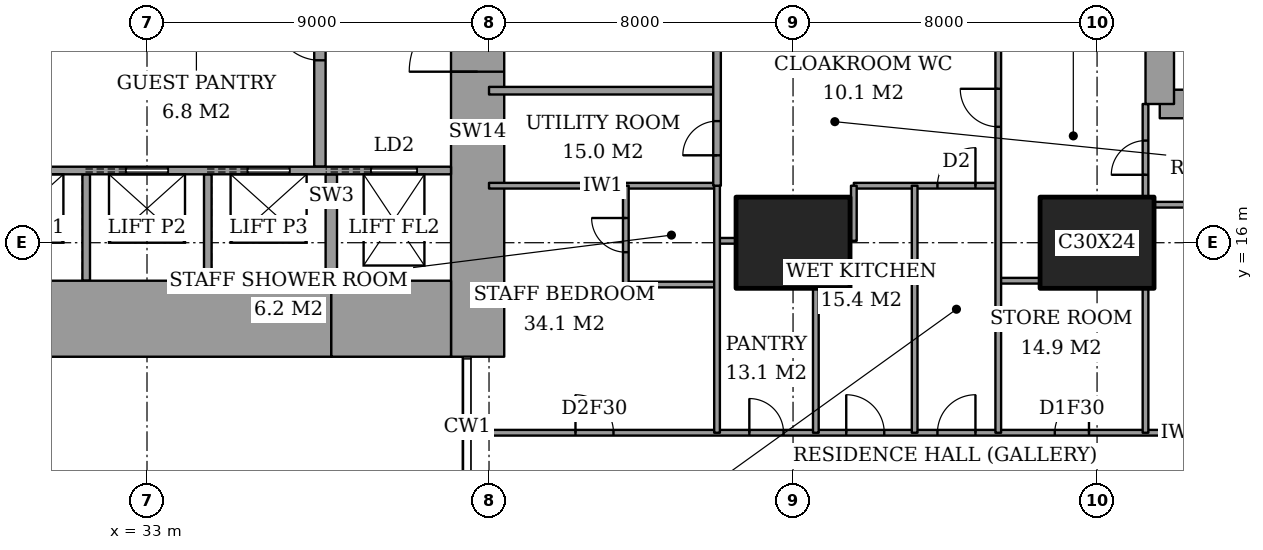
"""IFC4 building model, lengths in metres.
Left out: names, types, materials, properties, quantities, classifications, styles, units other than length and angle.
Written with IfcOpenShell. Run it as: python <this file> out.ifc"""

import sys

from ifc_helpers import new_model, si_unit, direction, frame, frame_2d, origin, origin_2d, place, context, subcontext, project, spatial, rectangle, extrude, element, fill, save


model = new_model("IFC4")
c1 = context("Model", 3, precision=1e-05, world=origin(), true_north=direction((0.0, 1.0)))
c2 = subcontext(c1, "Body", "Model", "MODEL_VIEW")
j1 = project(units=[si_unit("LENGTHUNIT", "METRE"), si_unit("PLANEANGLEUNIT", "RADIAN")], contexts=[c1])
p1 = place(None, origin())
s1 = spatial("IfcSite", under=j1, at=p1, CompositionType="ELEMENT")
p2 = place(p1, origin())
s2 = spatial("IfcBuilding", under=s1, at=p2, CompositionType="ELEMENT")
p3 = place(p2, frame((0.0, 0.0, 161.0)))
s3 = spatial("IfcBuildingStorey", under=s2, at=p3, CompositionType="ELEMENT", Elevation=161.0)
for number, where, z_axis, x_axis in (
    (1, (50.0, 16.0, 0.0), (0.0, 0.0, 1.0), (1.0, 0.0, 0.0)),
    (2, (58.0, 16.0, 0.0), (0.0, 0.0, 1.0), (1.0, 0.0, 0.0)),
):
    element("IfcColumn", number, at=place(p3, frame(where, z_axis=z_axis, x_axis=x_axis)), inside=s3, PredefinedType="COLUMN", context=c2, shape_type="SweptSolid", body=[
        extrude(rectangle(XDim=3.0, YDim=2.4, at=origin_2d()), origin(), (0.0, 0.0, 1.0), 3.6),
    ])
p4 = place(p3, frame((28.15, 14.0, 0.0), z_axis=(0.0, 0.0, 1.0), x_axis=(1.0, 0.0, 0.0)))
e3 = element("IfcWall", 3, at=p4, inside=s3, PredefinedType="SHEAR", context=c2, shape_type="SweptSolid", body=[
    extrude(rectangle(XDim=9.7, YDim=2.0, at=frame_2d((4.85, 0.0))), origin(), (0.0, 0.0, 1.0), 3.6),
])
p5 = place(p3, frame((37.85, 14.0, 0.0), z_axis=(0.0, 0.0, 1.0), x_axis=(1.0, 0.0, 0.0)))
e4 = element("IfcWall", 4, at=p5, inside=s3, PredefinedType="SHEAR", context=c2, shape_type="SweptSolid", body=[
    extrude(rectangle(XDim=3.15, YDim=2.0, at=frame_2d((1.575, 0.0))), origin(), (0.0, 0.0, 1.0), 3.6),
])
p6 = place(p3, frame((41.7, 13.0, 0.0), z_axis=(0.0, 0.0, 1.0), x_axis=(0.0, 1.0, 0.0)))
e5 = element("IfcWall", 5, at=p6, inside=s3, PredefinedType="SHEAR", context=c2, shape_type="SweptSolid", body=[
    extrude(rectangle(XDim=11.85, YDim=1.4, at=frame_2d((5.925, 0.0))), origin(), (0.0, 0.0, 1.0), 3.6),
])
p7 = place(p6, frame((7.5, 0.0, 0.0)))
e6 = element("IfcOpeningElement", 6, at=p7, cuts=e5, PredefinedType="OPENING", context=c2, shape_type="SweptSolid", body=[
    extrude(rectangle(XDim=1.8, YDim=2.4, at=frame_2d((0.9, 1.2))), frame((0.0, 0.71, 0.0), z_axis=(0.0, -1.0, 0.0), x_axis=(1.0, 0.0, 0.0)), (0.0, 0.0, 1.0), 1.42),
])
p8 = place(p3, frame((37.55, 18.0, 0.0), z_axis=(0.0, 0.0, 1.0), x_axis=(0.0, 1.0, 0.0)))
e7 = element("IfcWall", 7, at=p8, inside=s3, PredefinedType="PARTITIONING", context=c2, shape_type="SweptSolid", body=[
    extrude(rectangle(XDim=6.7, YDim=0.3, at=frame_2d((3.35, 0.0))), origin(), (0.0, 0.0, 1.0), 3.6),
])
p9 = place(p8, frame((2.8, 0.0, 0.0)))
e8 = element("IfcOpeningElement", 8, at=p9, cuts=e7, PredefinedType="OPENING", context=c2, shape_type="SweptSolid", body=[
    extrude(rectangle(XDim=1.2, YDim=2.1, at=frame_2d((0.6, 1.05))), frame((0.0, 0.16, 0.0), z_axis=(0.0, -1.0, 0.0), x_axis=(1.0, 0.0, 0.0)), (0.0, 0.0, 1.0), 0.32),
])
p10 = place(p3, frame((59.65, 19.65, 0.0), z_axis=(0.0, 0.0, 1.0), x_axis=(1.0, 0.0, 0.0)))
e9 = element("IfcWall", 9, at=p10, inside=s3, PredefinedType="SHEAR", context=c2, shape_type="SweptSolid", body=[
    extrude(rectangle(XDim=4.45, YDim=0.75, at=frame_2d((2.225, 0.0))), origin(), (0.0, 0.0, 1.0), 3.6),
])
p11 = place(p3, frame((59.65, 28.35, 0.0), z_axis=(0.0, 0.0, 1.0), x_axis=(0.0, -1.0, 0.0)))
e10 = element("IfcWall", 10, at=p11, inside=s3, PredefinedType="SHEAR", context=c2, shape_type="SweptSolid", body=[
    extrude(rectangle(XDim=8.7, YDim=0.75, at=frame_2d((4.35, 0.0))), origin(), (0.0, 0.0, 1.0), 3.6),
])
p12 = place(p11, frame((0.975, 0.0, 0.0)))
e11 = element("IfcOpeningElement", 11, at=p12, cuts=e10, PredefinedType="OPENING", context=c2, shape_type="SweptSolid", body=[
    extrude(rectangle(XDim=1.0, YDim=2.1, at=frame_2d((0.5, 1.05))), frame((0.0, 0.385, 0.0), z_axis=(0.0, -1.0, 0.0), x_axis=(1.0, 0.0, 0.0)), (0.0, 0.0, 1.0), 0.77),
])
p13 = place(p3, frame((41.439, 11.0, 0.0), z_axis=(0.0, 0.0, 1.0), x_axis=(1.0, 0.0, 0.0)))
e12 = element("IfcWall", 12, at=p13, inside=s3, PredefinedType="PARTITIONING", context=c2, shape_type="SweptSolid", body=[
    extrude(rectangle(XDim=25.011, YDim=0.15, at=frame_2d((12.505, 0.0))), origin(), (0.0, 0.0, 1.0), 3.35),
])
p14 = place(p13, frame((12.361, 0.0, 0.0)))
e13 = element("IfcOpeningElement", 13, at=p14, cuts=e12, PredefinedType="OPENING", context=c2, shape_type="SweptSolid", body=[
    extrude(rectangle(XDim=1.0, YDim=2.1, at=frame_2d((0.5, 1.05))), frame((0.0, 0.085, 0.0), z_axis=(0.0, -1.0, 0.0), x_axis=(1.0, 0.0, 0.0)), (0.0, 0.0, 1.0), 0.17),
])
p15 = place(p13, frame((20.924, 0.0, 0.0)))
e14 = element("IfcOpeningElement", 14, at=p15, cuts=e12, PredefinedType="OPENING", context=c2, shape_type="SweptSolid", body=[
    extrude(rectangle(XDim=1.0, YDim=2.1, at=frame_2d((0.5, 1.05))), frame((0.0, 0.085, 0.0), z_axis=(0.0, -1.0, 0.0), x_axis=(1.0, 0.0, 0.0)), (0.0, 0.0, 1.0), 0.17),
])
p16 = place(p13, frame((15.448, 0.0, 0.0)))
e15 = element("IfcOpeningElement", 15, at=p16, cuts=e12, PredefinedType="OPENING", context=c2, shape_type="SweptSolid", body=[
    extrude(rectangle(XDim=0.9, YDim=2.1, at=frame_2d((0.45, 1.05))), frame((0.0, 0.085, 0.0), z_axis=(0.0, -1.0, 0.0), x_axis=(1.0, 0.0, 0.0)), (0.0, 0.0, 1.0), 0.17),
])
p17 = place(p13, frame((9.961, 0.0, 0.0)))
e16 = element("IfcOpeningElement", 16, at=p17, cuts=e12, PredefinedType="OPENING", context=c2, shape_type="SweptSolid", body=[
    extrude(rectangle(XDim=1.0, YDim=2.1, at=frame_2d((0.5, 1.05))), frame((0.0, 0.085, 0.0), z_axis=(0.0, -1.0, 0.0), x_axis=(1.0, 0.0, 0.0)), (0.0, 0.0, 1.0), 0.17),
])
p18 = place(p13, frame((7.411, 0.0, 0.0)))
e17 = element("IfcOpeningElement", 17, at=p18, cuts=e12, PredefinedType="OPENING", context=c2, shape_type="SweptSolid", body=[
    extrude(rectangle(XDim=0.9, YDim=2.1, at=frame_2d((0.45, 1.05))), frame((0.0, 0.085, 0.0), z_axis=(0.0, -1.0, 0.0), x_axis=(1.0, 0.0, 0.0)), (0.0, 0.0, 1.0), 0.17),
])
p19 = place(p13, frame((2.836, 0.0, 0.0)))
e18 = element("IfcOpeningElement", 18, at=p19, cuts=e12, PredefinedType="OPENING", context=c2, shape_type="SweptSolid", body=[
    extrude(rectangle(XDim=1.0, YDim=2.1, at=frame_2d((0.5, 1.05))), frame((0.0, 0.085, 0.0), z_axis=(0.0, -1.0, 0.0), x_axis=(1.0, 0.0, 0.0)), (0.0, 0.0, 1.0), 0.17),
])
p20 = place(p3, frame((45.6, 14.9, 0.0), z_axis=(0.0, 0.0, 1.0), x_axis=(1.0, 0.0, 0.0)))
e19 = element("IfcWall", 19, at=p20, inside=s3, PredefinedType="PARTITIONING", context=c2, shape_type="SweptSolid", body=[
    extrude(rectangle(XDim=2.4, YDim=0.15, at=frame_2d((1.2, 0.0))), origin(), (0.0, 0.0, 1.0), 3.35),
])
p21 = place(p3, frame((55.4, 15.0, 0.0), z_axis=(0.0, 0.0, 1.0), x_axis=(1.0, 0.0, 0.0)))
e20 = element("IfcWall", 20, at=p21, inside=s3, PredefinedType="PARTITIONING", context=c2, shape_type="SweptSolid", body=[
    extrude(rectangle(XDim=1.1, YDim=0.15, at=frame_2d((0.55, 0.0))), origin(), (0.0, 0.0, 1.0), 3.35),
])
p22 = place(p3, frame((48.0, 16.05, 0.0), z_axis=(0.0, 0.0, 1.0), x_axis=(1.0, 0.0, 0.0)))
e21 = element("IfcWall", 21, at=p22, inside=s3, PredefinedType="PARTITIONING", context=c2, shape_type="SweptSolid", body=[
    extrude(rectangle(XDim=0.5, YDim=0.15, at=frame_2d((0.25, 0.0))), origin(), (0.0, 0.0, 1.0), 2.634),
])
p23 = place(p3, frame((59.5, 17.0, 0.0), z_axis=(0.0, 0.0, 1.0), x_axis=(1.0, 0.0, 0.0)))
e22 = element("IfcWall", 22, at=p23, inside=s3, PredefinedType="PARTITIONING", context=c2, shape_type="SweptSolid", body=[
    extrude(rectangle(XDim=5.15, YDim=0.15, at=frame_2d((2.575, 0.0))), origin(), (0.0, 0.0, 1.0), 3.35),
])
p24 = place(p3, frame((42.0, 17.5, 0.0), z_axis=(0.0, 0.0, 1.0), x_axis=(1.0, 0.0, 0.0)))
e23 = element("IfcWall", 23, at=p24, inside=s3, PredefinedType="PARTITIONING", context=c2, shape_type="SweptSolid", body=[
    extrude(rectangle(XDim=6.0, YDim=0.15, at=frame_2d((3.0, 0.0))), origin(), (0.0, 0.0, 1.0), 3.35),
])
p25 = place(p3, frame((51.6, 17.5, 0.0), z_axis=(0.0, 0.0, 1.0), x_axis=(1.0, 0.0, 0.0)))
e24 = element("IfcWall", 24, at=p25, inside=s3, PredefinedType="PARTITIONING", context=c2, shape_type="SweptSolid", body=[
    extrude(rectangle(XDim=3.8, YDim=0.15, at=frame_2d((1.9, 0.0))), origin(), (0.0, 0.0, 1.0), 3.35),
])
p26 = place(p25, frame((2.2, 0.0, 0.0)))
e25 = element("IfcOpeningElement", 25, at=p26, cuts=e24, PredefinedType="OPENING", context=c2, shape_type="SweptSolid", body=[
    extrude(rectangle(XDim=1.0, YDim=2.1, at=frame_2d((0.5, 1.05))), frame((0.0, 0.085, 0.0), z_axis=(0.0, -1.0, 0.0), x_axis=(1.0, 0.0, 0.0)), (0.0, 0.0, 1.0), 0.17),
])
p27 = place(p3, frame((42.0, 20.0, 0.0), z_axis=(0.0, 0.0, 1.0), x_axis=(1.0, 0.0, 0.0)))
e26 = element("IfcWall", 26, at=p27, inside=s3, PredefinedType="PARTITIONING", context=c2, shape_type="SweptSolid", body=[
    extrude(rectangle(XDim=6.0, YDim=0.2, at=frame_2d((3.0, 0.0))), origin(), (0.0, 0.0, 1.0), 3.35),
])
p28 = place(p3, frame((45.6, 14.9, 0.0), z_axis=(0.0, 0.0, 1.0), x_axis=(0.0, 1.0, 0.0)))
e27 = element("IfcWall", 27, at=p28, inside=s3, PredefinedType="PARTITIONING", context=c2, shape_type="SweptSolid", body=[
    extrude(rectangle(XDim=2.6, YDim=0.15, at=frame_2d((1.3, 0.0))), origin(), (0.0, 0.0, 1.0), 3.35),
])
p29 = place(p28, frame((0.85, 0.0, 0.0)))
e28 = element("IfcOpeningElement", 28, at=p29, cuts=e27, PredefinedType="OPENING", context=c2, shape_type="SweptSolid", body=[
    extrude(rectangle(XDim=0.9, YDim=2.1, at=frame_2d((0.45, 1.05))), frame((0.0, 0.085, 0.0), z_axis=(0.0, -1.0, 0.0), x_axis=(1.0, 0.0, 0.0)), (0.0, 0.0, 1.0), 0.17),
])
p30 = place(p3, frame((48.0, 17.5, 0.0), z_axis=(0.0, 0.0, 1.0), x_axis=(0.0, 1.0, 0.0)))
e29 = element("IfcWall", 29, at=p30, inside=s3, PredefinedType="PARTITIONING", context=c2, shape_type="SweptSolid", body=[
    extrude(rectangle(XDim=6.5, YDim=0.2, at=frame_2d((3.25, 0.0))), origin(), (0.0, 0.0, 1.0), 3.35),
])
p31 = place(p30, frame((3.9, 0.0, 0.0)))
e30 = element("IfcOpeningElement", 30, at=p31, cuts=e29, PredefinedType="OPENING", context=c2, shape_type="SweptSolid", body=[
    extrude(rectangle(XDim=1.2, YDim=2.4, at=frame_2d((0.6, 1.2))), frame((0.0, 0.11, 0.0), z_axis=(0.0, -1.0, 0.0), x_axis=(1.0, 0.0, 0.0)), (0.0, 0.0, 1.0), 0.22),
])
p32 = place(p30, frame((0.8, 0.0, 0.0)))
e31 = element("IfcOpeningElement", 31, at=p32, cuts=e29, PredefinedType="OPENING", context=c2, shape_type="SweptSolid", body=[
    extrude(rectangle(XDim=0.9, YDim=2.1, at=frame_2d((0.45, 1.05))), frame((0.0, 0.11, 0.0), z_axis=(0.0, -1.0, 0.0), x_axis=(1.0, 0.0, 0.0)), (0.0, 0.0, 1.0), 0.22),
])
p33 = place(p3, frame((48.0, 11.0, 0.0), z_axis=(0.0, 0.0, 1.0), x_axis=(0.0, 1.0, 0.0)))
e32 = element("IfcWall", 32, at=p33, inside=s3, PredefinedType="PARTITIONING", context=c2, shape_type="SweptSolid", body=[
    extrude(rectangle(XDim=6.5, YDim=0.15, at=frame_2d((3.25, 0.0))), origin(), (0.0, 0.0, 1.0), 3.35),
])
p34 = place(p3, frame((50.6, 11.0, 0.0), z_axis=(0.0, 0.0, 1.0), x_axis=(0.0, 1.0, 0.0)))
e33 = element("IfcWall", 33, at=p34, inside=s3, PredefinedType="PARTITIONING", context=c2, shape_type="SweptSolid", body=[
    extrude(rectangle(XDim=3.8, YDim=0.15, at=frame_2d((1.9, 0.0))), origin(), (0.0, 0.0, 1.0), 3.35),
])
p35 = place(p3, frame((51.6, 16.05, 0.0), z_axis=(0.0, 0.0, 1.0), x_axis=(0.0, 1.0, 0.0)))
e34 = element("IfcWall", 34, at=p35, inside=s3, PredefinedType="PARTITIONING", context=c2, shape_type="SweptSolid", body=[
    extrude(rectangle(XDim=1.45, YDim=0.15, at=frame_2d((0.725, 0.0))), origin(), (0.0, 0.0, 1.0), 3.35),
])
p36 = place(p3, frame((53.2, 11.0, 0.0), z_axis=(0.0, 0.0, 1.0), x_axis=(0.0, 1.0, 0.0)))
e35 = element("IfcWall", 35, at=p36, inside=s3, PredefinedType="PARTITIONING", context=c2, shape_type="SweptSolid", body=[
    extrude(rectangle(XDim=6.5, YDim=0.15, at=frame_2d((3.25, 0.0))), origin(), (0.0, 0.0, 1.0), 3.35),
])
p37 = place(p3, frame((55.4, 11.0, 0.0), z_axis=(0.0, 0.0, 1.0), x_axis=(0.0, 1.0, 0.0)))
e36 = element("IfcWall", 36, at=p37, inside=s3, PredefinedType="PARTITIONING", context=c2, shape_type="SweptSolid", body=[
    extrude(rectangle(XDim=10.6, YDim=0.15, at=frame_2d((5.3, 0.0))), origin(), (0.0, 0.0, 1.0), 3.35),
])
p38 = place(p37, frame((8.05, 0.0, 0.0)))
e37 = element("IfcOpeningElement", 37, at=p38, cuts=e36, PredefinedType="OPENING", context=c2, shape_type="SweptSolid", body=[
    extrude(rectangle(XDim=1.0, YDim=2.1, at=frame_2d((0.5, 1.05))), frame((0.0, 0.085, 0.0), z_axis=(0.0, -1.0, 0.0), x_axis=(1.0, 0.0, 0.0)), (0.0, 0.0, 1.0), 0.17),
])
p39 = place(p3, frame((59.275, 11.0, 0.0), z_axis=(0.0, 0.0, 1.0), x_axis=(0.0, 1.0, 0.0)))
e38 = element("IfcWall", 38, at=p39, inside=s3, PredefinedType="PARTITIONING", context=c2, shape_type="SweptSolid", body=[
    extrude(rectangle(XDim=3.8, YDim=0.15, at=frame_2d((1.9, 0.0))), origin(), (0.0, 0.0, 1.0), 3.35),
])
p40 = place(p3, frame((59.275, 17.2, 0.0), z_axis=(0.0, 0.0, 1.0), x_axis=(0.0, 1.0, 0.0)))
e39 = element("IfcWall", 39, at=p40, inside=s3, PredefinedType="PARTITIONING", context=c2, shape_type="SweptSolid", body=[
    extrude(rectangle(XDim=2.45, YDim=0.15, at=frame_2d((1.225, 0.0))), origin(), (0.0, 0.0, 1.0), 3.35),
])
p41 = place(p40, frame((0.587, 0.0, 0.0)))
e40 = element("IfcOpeningElement", 40, at=p41, cuts=e39, PredefinedType="OPENING", context=c2, shape_type="SweptSolid", body=[
    extrude(rectangle(XDim=0.9, YDim=2.1, at=frame_2d((0.45, 1.05))), frame((0.0, 0.085, 0.0), z_axis=(0.0, -1.0, 0.0), x_axis=(1.0, 0.0, 0.0)), (0.0, 0.0, 1.0), 0.17),
])
p42 = place(p3, frame((28.3, 17.9, 0.0), z_axis=(0.0, 0.0, 1.0), x_axis=(1.0, 0.0, 0.0)))
e41 = element("IfcWall", 41, at=p42, inside=s3, PredefinedType="PARTITIONING", context=c2, shape_type="SweptSolid", body=[
    extrude(rectangle(XDim=12.7, YDim=0.2, at=frame_2d((6.35, 0.0))), origin(), (0.0, 0.0, 1.0), 3.6),
])
p43 = place(p42, frame((0.95, 0.0, 0.0)))
e42 = element("IfcOpeningElement", 42, at=p43, cuts=e41, PredefinedType="OPENING", context=c2, shape_type="SweptSolid", body=[
    extrude(rectangle(XDim=1.1, YDim=2.1, at=frame_2d((0.55, 1.05))), frame((0.0, 0.11, 0.0), z_axis=(0.0, -1.0, 0.0), x_axis=(1.0, 0.0, 0.0)), (0.0, 0.0, 1.0), 0.22),
])
p44 = place(p42, frame((4.15, 0.0, 0.0)))
e43 = element("IfcOpeningElement", 43, at=p44, cuts=e41, PredefinedType="OPENING", context=c2, shape_type="SweptSolid", body=[
    extrude(rectangle(XDim=1.1, YDim=2.1, at=frame_2d((0.55, 1.05))), frame((0.0, 0.11, 0.0), z_axis=(0.0, -1.0, 0.0), x_axis=(1.0, 0.0, 0.0)), (0.0, 0.0, 1.0), 0.22),
])
p45 = place(p42, frame((7.35, 0.0, 0.0)))
e44 = element("IfcOpeningElement", 44, at=p45, cuts=e41, PredefinedType="OPENING", context=c2, shape_type="SweptSolid", body=[
    extrude(rectangle(XDim=1.1, YDim=2.1, at=frame_2d((0.55, 1.05))), frame((0.0, 0.11, 0.0), z_axis=(0.0, -1.0, 0.0), x_axis=(1.0, 0.0, 0.0)), (0.0, 0.0, 1.0), 0.22),
])
p46 = place(p42, frame((10.6, 0.0, 0.0)))
e45 = element("IfcOpeningElement", 45, at=p46, cuts=e41, PredefinedType="OPENING", context=c2, shape_type="SweptSolid", body=[
    extrude(rectangle(XDim=1.2, YDim=2.1, at=frame_2d((0.6, 1.05))), frame((0.0, 0.11, 0.0), z_axis=(0.0, -1.0, 0.0), x_axis=(1.0, 0.0, 0.0)), (0.0, 0.0, 1.0), 0.22),
])
for number, where, z_axis, x_axis in (
    (46, (31.4, 15.0, 0.0), (0.0, 0.0, 1.0), (0.0, 1.0, 0.0)),
    (47, (34.6, 15.0, 0.0), (0.0, 0.0, 1.0), (0.0, 1.0, 0.0)),
):
    element("IfcWall", number, at=place(p3, frame(where, z_axis=z_axis, x_axis=x_axis)), inside=s3, PredefinedType="PARTITIONING", context=c2, shape_type="SweptSolid", body=[
        extrude(rectangle(XDim=2.8, YDim=0.2, at=frame_2d((1.4, 0.0))), origin(), (0.0, 0.0, 1.0), 3.6),
    ])
p47 = place(p3, frame((37.85, 15.0, 0.0), z_axis=(0.0, 0.0, 1.0), x_axis=(0.0, 1.0, 0.0)))
e48 = element("IfcWall", 48, at=p47, inside=s3, PredefinedType="SHEAR", context=c2, shape_type="SweptSolid", body=[
    extrude(rectangle(XDim=2.8, YDim=0.3, at=frame_2d((1.4, 0.0))), origin(), (0.0, 0.0, 1.0), 3.6),
])
p48 = place(p14, origin())
e49 = element("IfcDoor", 49, at=p48, inside=s3, OperationType="SINGLE_SWING_LEFT", PredefinedType="DOOR", context=c2, shape_type="SweptSolid", body=[
    extrude(rectangle(XDim=1.0, YDim=2.1, at=frame_2d((0.5, 1.05))), frame((0.0, 0.025, 0.0), z_axis=(0.0, -1.0, 0.0), x_axis=(1.0, 0.0, 0.0)), (0.0, 0.0, 1.0), 0.05),
])
fill(e13, e49)
p49 = place(p41, origin())
e50 = element("IfcDoor", 50, at=p49, inside=s3, OperationType="SINGLE_SWING_RIGHT", PredefinedType="DOOR", context=c2, shape_type="SweptSolid", body=[
    extrude(rectangle(XDim=0.9, YDim=2.1, at=frame_2d((0.45, 1.05))), frame((0.0, 0.025, 0.0), z_axis=(0.0, -1.0, 0.0), x_axis=(1.0, 0.0, 0.0)), (0.0, 0.0, 1.0), 0.05),
])
fill(e40, e50)
p50 = place(p16, origin())
e51 = element("IfcDoor", 51, at=p50, inside=s3, OperationType="SINGLE_SWING_LEFT", PredefinedType="DOOR", context=c2, shape_type="SweptSolid", body=[
    extrude(rectangle(XDim=0.9, YDim=2.1, at=frame_2d((0.45, 1.05))), frame((0.0, 0.025, 0.0), z_axis=(0.0, -1.0, 0.0), x_axis=(1.0, 0.0, 0.0)), (0.0, 0.0, 1.0), 0.05),
])
fill(e15, e51)
p51 = place(p38, origin())
e52 = element("IfcDoor", 52, at=p51, inside=s3, OperationType="SINGLE_SWING_LEFT", PredefinedType="DOOR", context=c2, shape_type="SweptSolid", body=[
    extrude(rectangle(XDim=1.0, YDim=2.1, at=frame_2d((0.5, 1.05))), frame((0.0, 0.025, 0.0), z_axis=(0.0, -1.0, 0.0), x_axis=(1.0, 0.0, 0.0)), (0.0, 0.0, 1.0), 0.05),
])
fill(e37, e52)
p52 = place(p26, origin())
e53 = element("IfcDoor", 53, at=p52, inside=s3, OperationType="SINGLE_SWING_LEFT", PredefinedType="DOOR", context=c2, shape_type="SweptSolid", body=[
    extrude(rectangle(XDim=1.0, YDim=2.1, at=frame_2d((0.5, 1.05))), frame((0.0, 0.025, 0.0), z_axis=(0.0, -1.0, 0.0), x_axis=(1.0, 0.0, 0.0)), (0.0, 0.0, 1.0), 0.05),
])
fill(e25, e53)
p53 = place(p17, origin())
e54 = element("IfcDoor", 54, at=p53, inside=s3, OperationType="SINGLE_SWING_RIGHT", PredefinedType="DOOR", context=c2, shape_type="SweptSolid", body=[
    extrude(rectangle(XDim=1.0, YDim=2.1, at=frame_2d((0.5, 1.05))), frame((0.0, 0.025, 0.0), z_axis=(0.0, -1.0, 0.0), x_axis=(1.0, 0.0, 0.0)), (0.0, 0.0, 1.0), 0.05),
])
fill(e16, e54)
p54 = place(p18, origin())
e55 = element("IfcDoor", 55, at=p54, inside=s3, OperationType="SINGLE_SWING_RIGHT", PredefinedType="DOOR", context=c2, shape_type="SweptSolid", body=[
    extrude(rectangle(XDim=0.9, YDim=2.1, at=frame_2d((0.45, 1.05))), frame((0.0, 0.025, 0.0), z_axis=(0.0, -1.0, 0.0), x_axis=(1.0, 0.0, 0.0)), (0.0, 0.0, 1.0), 0.05),
])
fill(e17, e55)
p55 = place(p29, origin())
e56 = element("IfcDoor", 56, at=p55, inside=s3, OperationType="SINGLE_SWING_LEFT", PredefinedType="DOOR", context=c2, shape_type="SweptSolid", body=[
    extrude(rectangle(XDim=0.9, YDim=2.1, at=frame_2d((0.45, 1.05))), frame((0.0, 0.025, 0.0), z_axis=(0.0, -1.0, 0.0), x_axis=(1.0, 0.0, 0.0)), (0.0, 0.0, 1.0), 0.05),
])
fill(e28, e56)
p56 = place(p19, origin())
e57 = element("IfcDoor", 57, at=p56, inside=s3, OperationType="SINGLE_SWING_RIGHT", PredefinedType="DOOR", context=c2, shape_type="SweptSolid", body=[
    extrude(rectangle(XDim=1.0, YDim=2.1, at=frame_2d((0.5, 1.05))), frame((0.0, 0.025, 0.0), z_axis=(0.0, -1.0, 0.0), x_axis=(1.0, 0.0, 0.0)), (0.0, 0.0, 1.0), 0.05),
])
fill(e18, e57)
p57 = place(p32, origin())
e58 = element("IfcDoor", 58, at=p57, inside=s3, OperationType="SINGLE_SWING_RIGHT", PredefinedType="DOOR", context=c2, shape_type="SweptSolid", body=[
    extrude(rectangle(XDim=0.9, YDim=2.1, at=frame_2d((0.45, 1.05))), frame((0.0, 0.025, 0.0), z_axis=(0.0, -1.0, 0.0), x_axis=(1.0, 0.0, 0.0)), (0.0, 0.0, 1.0), 0.05),
])
fill(e31, e58)
p58 = place(p9, origin())
e59 = element("IfcDoor", 59, at=p58, inside=s3, OperationType="SINGLE_SWING_LEFT", PredefinedType="DOOR", context=c2, shape_type="SweptSolid", body=[
    extrude(rectangle(XDim=1.2, YDim=2.1, at=frame_2d((0.6, 1.05))), frame((0.0, 0.025, 0.0), z_axis=(0.0, -1.0, 0.0), x_axis=(1.0, 0.0, 0.0)), (0.0, 0.0, 1.0), 0.05),
])
fill(e8, e59)
p59 = place(p7, origin())
e60 = element("IfcDoor", 60, at=p59, inside=s3, OperationType="DOUBLE_DOOR_DOUBLE_SWING", PredefinedType="DOOR", context=c2, shape_type="SweptSolid", body=[
    extrude(rectangle(XDim=1.8, YDim=2.4, at=frame_2d((0.9, 1.2))), frame((0.0, 0.025, 0.0), z_axis=(0.0, -1.0, 0.0), x_axis=(1.0, 0.0, 0.0)), (0.0, 0.0, 1.0), 0.05),
])
fill(e6, e60)
p60 = place(p44, origin())
e61 = element("IfcDoor", 61, at=p60, inside=s3, OperationType="SLIDING_TO_LEFT", PredefinedType="DOOR", context=c2, shape_type="SweptSolid", body=[
    extrude(rectangle(XDim=1.1, YDim=2.1, at=frame_2d((0.55, 1.05))), frame((0.0, 0.025, 0.0), z_axis=(0.0, -1.0, 0.0), x_axis=(1.0, 0.0, 0.0)), (0.0, 0.0, 1.0), 0.05),
])
fill(e43, e61)
p61 = place(p45, origin())
e62 = element("IfcDoor", 62, at=p61, inside=s3, OperationType="SLIDING_TO_LEFT", PredefinedType="DOOR", context=c2, shape_type="SweptSolid", body=[
    extrude(rectangle(XDim=1.1, YDim=2.1, at=frame_2d((0.55, 1.05))), frame((0.0, 0.025, 0.0), z_axis=(0.0, -1.0, 0.0), x_axis=(1.0, 0.0, 0.0)), (0.0, 0.0, 1.0), 0.05),
])
fill(e44, e62)
p62 = place(p46, origin())
e63 = element("IfcDoor", 63, at=p62, inside=s3, OperationType="SLIDING_TO_LEFT", PredefinedType="DOOR", context=c2, shape_type="SweptSolid", body=[
    extrude(rectangle(XDim=1.2, YDim=2.1, at=frame_2d((0.6, 1.05))), frame((0.0, 0.025, 0.0), z_axis=(0.0, -1.0, 0.0), x_axis=(1.0, 0.0, 0.0)), (0.0, 0.0, 1.0), 0.05),
])
fill(e45, e63)
save(model, sys.argv[1])
